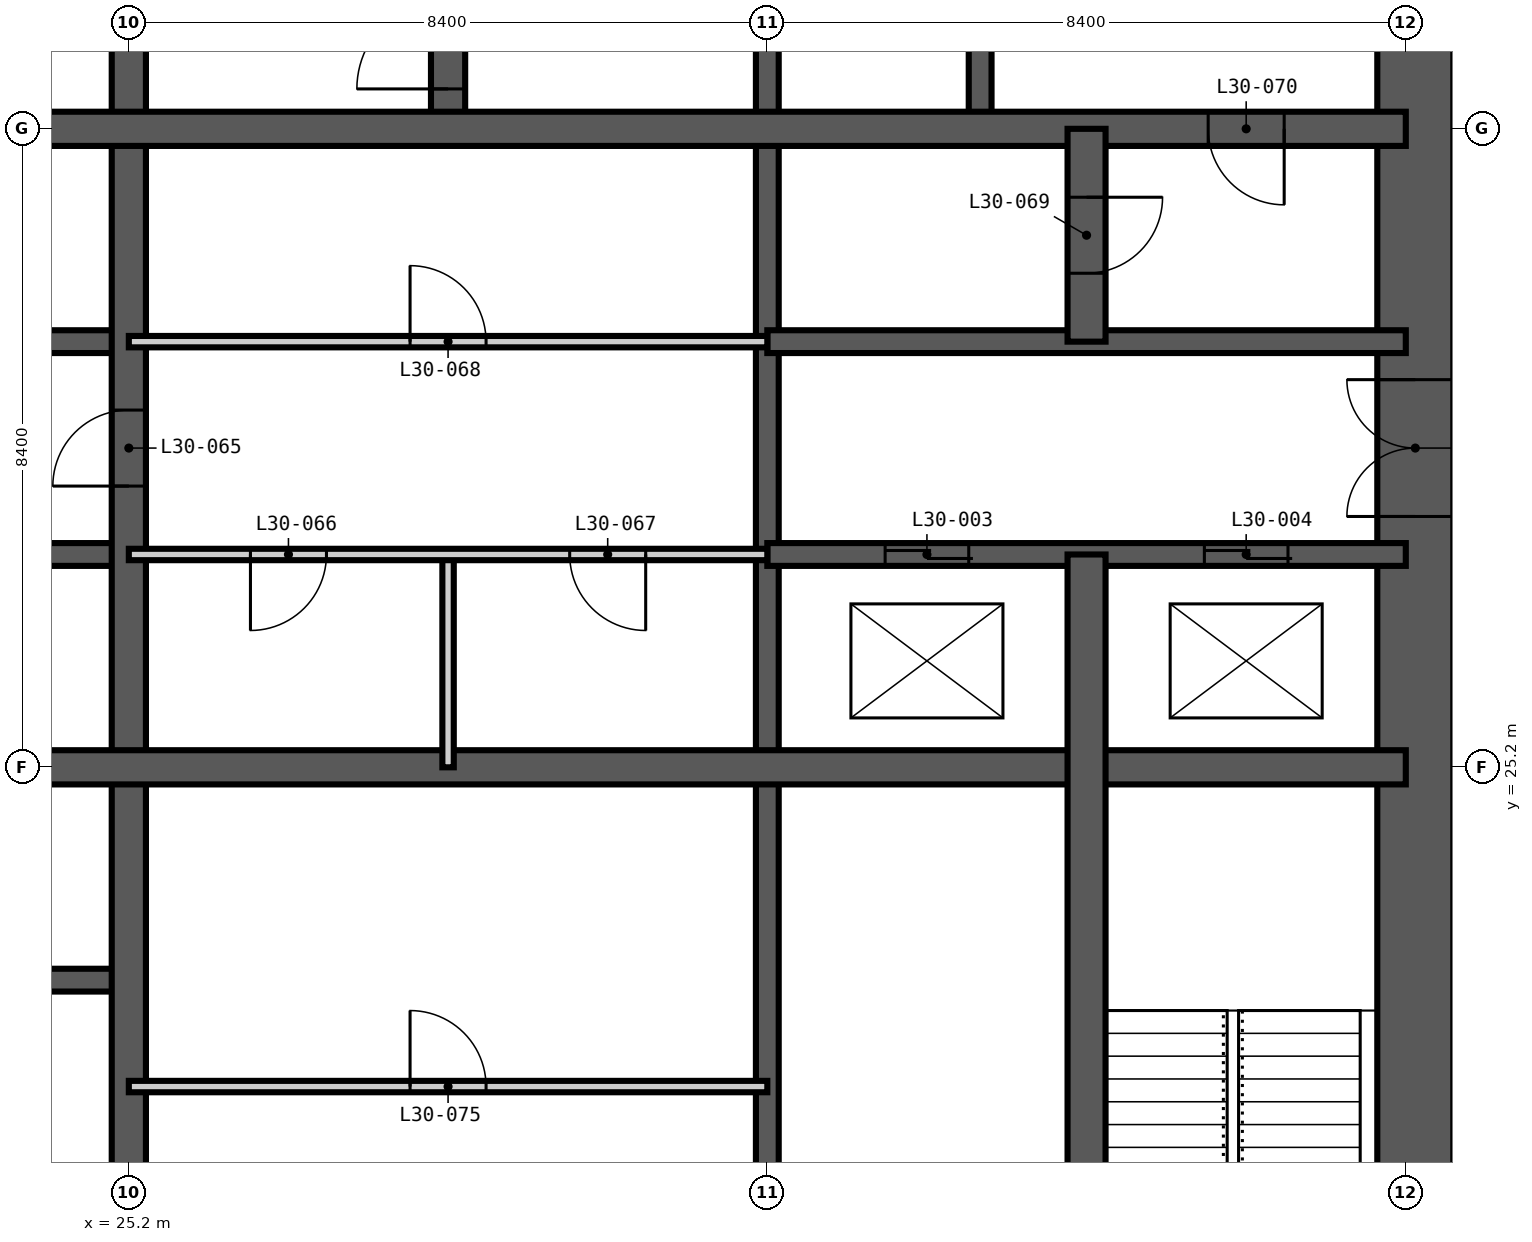
"""IFC4 building model, lengths in metres.
Left out: names, types, materials, properties, quantities, classifications, styles, units other than length and angle.
Written with IfcOpenShell. Run it as: python <this file> out.ifc"""

import sys

from ifc_helpers import new_model, si_unit, direction, frame, frame_2d, origin, place, context, subcontext, project, spatial, rectangle, extrude, element, fill, save


model = new_model("IFC4")
c1 = context("Model", 3, precision=1e-05, world=origin(), true_north=direction((0.0, 1.0)))
c2 = subcontext(c1, "Body", "Model", "MODEL_VIEW")
j1 = project(units=[si_unit("LENGTHUNIT", "METRE"), si_unit("PLANEANGLEUNIT", "RADIAN")], contexts=[c1])
p1 = place(None, origin())
s1 = spatial("IfcSite", under=j1, at=p1, CompositionType="ELEMENT")
p2 = place(p1, origin())
s2 = spatial("IfcBuilding", under=s1, at=p2, CompositionType="ELEMENT")
p3 = place(p2, frame((0.0, 0.0, 118.8)))
s3 = spatial("IfcBuildingStorey", under=s2, at=p3, CompositionType="ELEMENT", Elevation=118.8)
p4 = place(p3, frame((42.125, 17.175, -0.35), z_axis=(0.0, 0.0, 1.0), x_axis=(0.0, 1.0, 0.0)))
e1 = element("IfcWall", 1, at=p4, inside=s3, PredefinedType="SHEAR", context=c2, shape_type="SweptSolid", body=[
    extrude(rectangle(XDim=24.45, YDim=1.0, at=frame_2d((12.225, 0.0))), origin(), (0.0, 0.0, 1.0), 3.6),
])
p5 = place(p4, frame((0.425, 0.0, 0.35)))
e2 = element("IfcOpeningElement", 2, at=p5, cuts=e1, PredefinedType="OPENING", context=c2, shape_type="SweptSolid", body=[
    extrude(rectangle(XDim=1.2, YDim=2.2, at=frame_2d((0.6, 1.1))), frame((0.0, 0.51, 0.0), z_axis=(0.0, -1.0, 0.0), x_axis=(1.0, 0.0, 0.0)), (0.0, 0.0, 1.0), 1.02),
])
p6 = place(p4, frame((11.325, 0.0, 0.35)))
e3 = element("IfcOpeningElement", 3, at=p6, cuts=e1, PredefinedType="OPENING", context=c2, shape_type="SweptSolid", body=[
    extrude(rectangle(XDim=1.8, YDim=2.2, at=frame_2d((0.9, 1.1))), frame((0.0, 0.51, 0.0), z_axis=(0.0, -1.0, 0.0), x_axis=(1.0, 0.0, 0.0)), (0.0, 0.0, 1.0), 1.02),
])
p7 = place(p4, frame((20.125, 0.0, 0.35)))
e4 = element("IfcOpeningElement", 4, at=p7, cuts=e1, PredefinedType="OPENING", context=c2, shape_type="SweptSolid", body=[
    extrude(rectangle(XDim=1.0, YDim=2.1, at=frame_2d((0.5, 1.05))), frame((0.0, 0.51, 0.0), z_axis=(0.0, -1.0, 0.0), x_axis=(1.0, 0.0, 0.0)), (0.0, 0.0, 1.0), 1.02),
])
p8 = place(p3, frame((33.6, 16.8, -0.35), z_axis=(0.0, 0.0, 1.0), x_axis=(0.0, 1.0, 0.0)))
e5 = element("IfcWall", 5, at=p8, inside=s3, PredefinedType="SHEAR", context=c2, shape_type="SweptSolid", body=[
    extrude(rectangle(XDim=25.2, YDim=0.3, at=frame_2d((12.6, 0.0))), origin(), (0.0, 0.0, 1.0), 3.6),
])
p9 = place(p8, frame((22.5, 0.0, 0.35)))
e6 = element("IfcOpeningElement", 6, at=p9, cuts=e5, PredefinedType="OPENING", context=c2, shape_type="SweptSolid", body=[
    extrude(rectangle(XDim=1.2, YDim=2.2, at=frame_2d((0.6, 1.1))), frame((0.0, 0.16, 0.0), z_axis=(0.0, -1.0, 0.0), x_axis=(1.0, 0.0, 0.0)), (0.0, 0.0, 1.0), 0.32),
])
p10 = place(p8, frame((18.3, 0.0, 0.35)))
e7 = element("IfcOpeningElement", 7, at=p10, cuts=e5, PredefinedType="OPENING", context=c2, shape_type="SweptSolid", body=[
    extrude(rectangle(XDim=1.2, YDim=2.2, at=frame_2d((0.6, 1.1))), frame((0.0, 0.16, 0.0), z_axis=(0.0, -1.0, 0.0), x_axis=(1.0, 0.0, 0.0)), (0.0, 0.0, 1.0), 0.32),
])
for number, where, z_axis, x_axis in (
    (8, (36.4, 33.6, -0.35), (0.0, 0.0, 1.0), (0.0, 1.0, 0.0)),
    (9, (16.8, 22.4, -0.35), (0.0, 0.0, 1.0), (1.0, 0.0, 0.0)),
):
    element("IfcWall", number, at=place(p3, frame(where, z_axis=z_axis, x_axis=x_axis)), inside=s3, PredefinedType="SHEAR", context=c2, shape_type="SweptSolid", body=[
        extrude(rectangle(XDim=8.4, YDim=0.3, at=frame_2d((4.2, 0.0))), origin(), (0.0, 0.0, 1.0), 3.6),
    ])
p11 = place(p3, frame((16.8, 28.0, -0.35), z_axis=(0.0, 0.0, 1.0), x_axis=(1.0, 0.0, 0.0)))
e10 = element("IfcWall", 10, at=p11, inside=s3, PredefinedType="SHEAR", context=c2, shape_type="SweptSolid", body=[
    extrude(rectangle(XDim=8.4, YDim=0.3, at=frame_2d((4.2, 0.0))), origin(), (0.0, 0.0, 1.0), 3.6),
])
p12 = place(p11, frame((1.55, 0.0, 0.35)))
e11 = element("IfcOpeningElement", 11, at=p12, cuts=e10, PredefinedType="OPENING", context=c2, shape_type="SweptSolid", body=[
    extrude(rectangle(XDim=1.1, YDim=2.2, at=frame_2d((0.55, 1.1))), frame((0.0, 0.16, 0.0), z_axis=(0.0, -1.0, 0.0), x_axis=(1.0, 0.0, 0.0)), (0.0, 0.0, 1.0), 0.32),
])
p13 = place(p11, frame((5.75, 0.0, 0.35)))
e12 = element("IfcOpeningElement", 12, at=p13, cuts=e10, PredefinedType="OPENING", context=c2, shape_type="SweptSolid", body=[
    extrude(rectangle(XDim=1.1, YDim=2.2, at=frame_2d((0.55, 1.1))), frame((0.0, 0.16, 0.0), z_axis=(0.0, -1.0, 0.0), x_axis=(1.0, 0.0, 0.0)), (0.0, 0.0, 1.0), 0.32),
])
p14 = place(p3, frame((33.6, 28.0, -0.35), z_axis=(0.0, 0.0, 1.0), x_axis=(1.0, 0.0, 0.0)))
e13 = element("IfcWall", 13, at=p14, inside=s3, PredefinedType="SHEAR", context=c2, shape_type="SweptSolid", body=[
    extrude(rectangle(XDim=8.4, YDim=0.3, at=frame_2d((4.2, 0.0))), origin(), (0.0, 0.0, 1.0), 3.6),
])
p15 = place(p14, frame((1.55, 0.0, 0.35)))
e14 = element("IfcOpeningElement", 14, at=p15, cuts=e13, PredefinedType="OPENING", context=c2, shape_type="SweptSolid", body=[
    extrude(rectangle(XDim=1.1, YDim=2.2, at=frame_2d((0.55, 1.1))), frame((0.0, 0.16, 0.0), z_axis=(0.0, -1.0, 0.0), x_axis=(1.0, 0.0, 0.0)), (0.0, 0.0, 1.0), 0.32),
])
p16 = place(p14, frame((5.75, 0.0, 0.35)))
e15 = element("IfcOpeningElement", 15, at=p16, cuts=e13, PredefinedType="OPENING", context=c2, shape_type="SweptSolid", body=[
    extrude(rectangle(XDim=1.1, YDim=2.2, at=frame_2d((0.55, 1.1))), frame((0.0, 0.16, 0.0), z_axis=(0.0, -1.0, 0.0), x_axis=(1.0, 0.0, 0.0)), (0.0, 0.0, 1.0), 0.32),
])
p17 = place(p3, frame((16.8, 30.8, -0.35), z_axis=(0.0, 0.0, 1.0), x_axis=(1.0, 0.0, 0.0)))
e16 = element("IfcWall", 16, at=p17, inside=s3, PredefinedType="SHEAR", context=c2, shape_type="SweptSolid", body=[
    extrude(rectangle(XDim=8.4, YDim=0.3, at=frame_2d((4.2, 0.0))), origin(), (0.0, 0.0, 1.0), 3.6),
])
p18 = place(p17, frame((1.55, 0.0, 0.35)))
e17 = element("IfcOpeningElement", 17, at=p18, cuts=e16, PredefinedType="OPENING", context=c2, shape_type="SweptSolid", body=[
    extrude(rectangle(XDim=1.1, YDim=2.2, at=frame_2d((0.55, 1.1))), frame((0.0, 0.16, 0.0), z_axis=(0.0, -1.0, 0.0), x_axis=(1.0, 0.0, 0.0)), (0.0, 0.0, 1.0), 0.32),
])
p19 = place(p17, frame((5.75, 0.0, 0.35)))
e18 = element("IfcOpeningElement", 18, at=p19, cuts=e16, PredefinedType="OPENING", context=c2, shape_type="SweptSolid", body=[
    extrude(rectangle(XDim=1.1, YDim=2.2, at=frame_2d((0.55, 1.1))), frame((0.0, 0.16, 0.0), z_axis=(0.0, -1.0, 0.0), x_axis=(1.0, 0.0, 0.0)), (0.0, 0.0, 1.0), 0.32),
])
p20 = place(p3, frame((33.6, 30.8, -0.35), z_axis=(0.0, 0.0, 1.0), x_axis=(1.0, 0.0, 0.0)))
e19 = element("IfcWall", 19, at=p20, inside=s3, PredefinedType="SHEAR", context=c2, shape_type="SweptSolid", body=[
    extrude(rectangle(XDim=8.4, YDim=0.3, at=frame_2d((4.2, 0.0))), origin(), (0.0, 0.0, 1.0), 3.6),
])
p21 = place(p3, frame((25.2, 16.8, -0.35), z_axis=(0.0, 0.0, 1.0), x_axis=(0.0, 1.0, 0.0)))
e20 = element("IfcWall", 20, at=p21, inside=s3, PredefinedType="SHEAR", context=c2, shape_type="SweptSolid", body=[
    extrude(rectangle(XDim=25.2, YDim=0.45, at=frame_2d((12.6, 0.0))), origin(), (0.0, 0.0, 1.0), 3.6),
])
p22 = place(p21, frame((12.1, 0.0, 0.35)))
e21 = element("IfcOpeningElement", 21, at=p22, cuts=e20, PredefinedType="OPENING", context=c2, shape_type="SweptSolid", body=[
    extrude(rectangle(XDim=1.0, YDim=2.1, at=frame_2d((0.5, 1.05))), frame((0.0, 0.235, 0.0), z_axis=(0.0, -1.0, 0.0), x_axis=(1.0, 0.0, 0.0)), (0.0, 0.0, 1.0), 0.47),
])
p23 = place(p3, frame((29.4, 33.6, -0.35), z_axis=(0.0, 0.0, 1.0), x_axis=(0.0, 1.0, 0.0)))
e22 = element("IfcWall", 22, at=p23, inside=s3, PredefinedType="SHEAR", context=c2, shape_type="SweptSolid", body=[
    extrude(rectangle(XDim=8.4, YDim=0.45, at=frame_2d((4.2, 0.0))), origin(), (0.0, 0.0, 1.0), 3.6),
])
p24 = place(p23, frame((0.525, 0.0, 0.35)))
e23 = element("IfcOpeningElement", 23, at=p24, cuts=e22, PredefinedType="OPENING", context=c2, shape_type="SweptSolid", body=[
    extrude(rectangle(XDim=1.2, YDim=2.2, at=frame_2d((0.6, 1.1))), frame((0.0, 0.235, 0.0), z_axis=(0.0, -1.0, 0.0), x_axis=(1.0, 0.0, 0.0)), (0.0, 0.0, 1.0), 0.47),
])
p25 = place(p3, frame((16.8, 25.2, -0.35), z_axis=(0.0, 0.0, 1.0), x_axis=(1.0, 0.0, 0.0)))
e24 = element("IfcWall", 24, at=p25, inside=s3, PredefinedType="SHEAR", context=c2, shape_type="SweptSolid", body=[
    extrude(rectangle(XDim=25.2, YDim=0.45, at=frame_2d((12.6, 0.0))), origin(), (0.0, 0.0, 1.0), 3.6),
])
p26 = place(p3, frame((16.8, 33.6, -0.35), z_axis=(0.0, 0.0, 1.0), x_axis=(1.0, 0.0, 0.0)))
e25 = element("IfcWall", 25, at=p26, inside=s3, PredefinedType="SHEAR", context=c2, shape_type="SweptSolid", body=[
    extrude(rectangle(XDim=25.2, YDim=0.45, at=frame_2d((12.6, 0.0))), origin(), (0.0, 0.0, 1.0), 3.6),
])
p27 = place(p26, frame((22.6, 0.0, 0.35)))
e26 = element("IfcOpeningElement", 26, at=p27, cuts=e25, PredefinedType="OPENING", context=c2, shape_type="SweptSolid", body=[
    extrude(rectangle(XDim=1.0, YDim=2.1, at=frame_2d((0.5, 1.05))), frame((0.0, 0.235, 0.0), z_axis=(0.0, -1.0, 0.0), x_axis=(1.0, 0.0, 0.0)), (0.0, 0.0, 1.0), 0.47),
])
p28 = place(p3, frame((37.8, 16.8, -0.35), z_axis=(0.0, 0.0, 1.0), x_axis=(0.0, 1.0, 0.0)))
e27 = element("IfcWall", 27, at=p28, inside=s3, PredefinedType="SHEAR", context=c2, shape_type="SweptSolid", body=[
    extrude(rectangle(XDim=11.2, YDim=0.5, at=frame_2d((5.6, 0.0))), origin(), (0.0, 0.0, 1.0), 3.6),
])
p29 = place(p3, frame((37.8, 30.8, -0.35), z_axis=(0.0, 0.0, 1.0), x_axis=(0.0, 1.0, 0.0)))
e28 = element("IfcWall", 28, at=p29, inside=s3, PredefinedType="SHEAR", context=c2, shape_type="SweptSolid", body=[
    extrude(rectangle(XDim=2.8, YDim=0.5, at=frame_2d((1.4, 0.0))), origin(), (0.0, 0.0, 1.0), 3.6),
])
p30 = place(p29, frame((0.9, 0.0, 0.35)))
e29 = element("IfcOpeningElement", 29, at=p30, cuts=e28, PredefinedType="OPENING", context=c2, shape_type="SweptSolid", body=[
    extrude(rectangle(XDim=1.0, YDim=2.1, at=frame_2d((0.5, 1.05))), frame((0.0, 0.26, 0.0), z_axis=(0.0, -1.0, 0.0), x_axis=(1.0, 0.0, 0.0)), (0.0, 0.0, 1.0), 0.52),
])
p31 = place(p3, frame((29.4, 25.2, 0.0), z_axis=(0.0, 0.0, 1.0), x_axis=(0.0, 1.0, 0.0)))
e30 = element("IfcWall", 30, at=p31, inside=s3, PredefinedType="PARTITIONING", context=c2, shape_type="SweptSolid", body=[
    extrude(rectangle(XDim=2.8, YDim=0.15, at=frame_2d((1.4, 0.0))), origin(), (0.0, 0.0, 1.0), 3.25),
])
p32 = place(p3, frame((25.2, 21.0, 0.0), z_axis=(0.0, 0.0, 1.0), x_axis=(1.0, 0.0, 0.0)))
e31 = element("IfcWall", 31, at=p32, inside=s3, PredefinedType="PARTITIONING", context=c2, shape_type="SweptSolid", body=[
    extrude(rectangle(XDim=8.4, YDim=0.15, at=frame_2d((4.2, 0.0))), origin(), (0.0, 0.0, 1.0), 3.25),
])
p33 = place(p32, frame((3.7, 0.0, 0.0)))
e32 = element("IfcOpeningElement", 32, at=p33, cuts=e31, PredefinedType="OPENING", context=c2, shape_type="SweptSolid", body=[
    extrude(rectangle(XDim=1.0, YDim=2.1, at=frame_2d((0.5, 1.05))), frame((0.0, 0.085, 0.0), z_axis=(0.0, -1.0, 0.0), x_axis=(1.0, 0.0, 0.0)), (0.0, 0.0, 1.0), 0.17),
])
p34 = place(p3, frame((25.2, 28.0, 0.0), z_axis=(0.0, 0.0, 1.0), x_axis=(1.0, 0.0, 0.0)))
e33 = element("IfcWall", 33, at=p34, inside=s3, PredefinedType="PARTITIONING", context=c2, shape_type="SweptSolid", body=[
    extrude(rectangle(XDim=8.4, YDim=0.15, at=frame_2d((4.2, 0.0))), origin(), (0.0, 0.0, 1.0), 3.25),
])
p35 = place(p34, frame((1.6, 0.0, 0.0)))
e34 = element("IfcOpeningElement", 34, at=p35, cuts=e33, PredefinedType="OPENING", context=c2, shape_type="SweptSolid", body=[
    extrude(rectangle(XDim=1.0, YDim=2.1, at=frame_2d((0.5, 1.05))), frame((0.0, 0.085, 0.0), z_axis=(0.0, -1.0, 0.0), x_axis=(1.0, 0.0, 0.0)), (0.0, 0.0, 1.0), 0.17),
])
p36 = place(p34, frame((5.8, 0.0, 0.0)))
e35 = element("IfcOpeningElement", 35, at=p36, cuts=e33, PredefinedType="OPENING", context=c2, shape_type="SweptSolid", body=[
    extrude(rectangle(XDim=1.0, YDim=2.1, at=frame_2d((0.5, 1.05))), frame((0.0, 0.085, 0.0), z_axis=(0.0, -1.0, 0.0), x_axis=(1.0, 0.0, 0.0)), (0.0, 0.0, 1.0), 0.17),
])
p37 = place(p3, frame((25.2, 30.8, 0.0), z_axis=(0.0, 0.0, 1.0), x_axis=(1.0, 0.0, 0.0)))
e36 = element("IfcWall", 36, at=p37, inside=s3, PredefinedType="PARTITIONING", context=c2, shape_type="SweptSolid", body=[
    extrude(rectangle(XDim=8.4, YDim=0.15, at=frame_2d((4.2, 0.0))), origin(), (0.0, 0.0, 1.0), 3.25),
])
p38 = place(p37, frame((3.7, 0.0, 0.0)))
e37 = element("IfcOpeningElement", 37, at=p38, cuts=e36, PredefinedType="OPENING", context=c2, shape_type="SweptSolid", body=[
    extrude(rectangle(XDim=1.0, YDim=2.1, at=frame_2d((0.5, 1.05))), frame((0.0, 0.085, 0.0), z_axis=(0.0, -1.0, 0.0), x_axis=(1.0, 0.0, 0.0)), (0.0, 0.0, 1.0), 0.17),
])
p39 = place(p24, origin())
e38 = element("IfcDoor", 38, at=p39, inside=s3, OperationType="SINGLE_SWING_LEFT", PredefinedType="DOOR", context=c2, shape_type="SweptSolid", body=[
    extrude(rectangle(XDim=1.2, YDim=2.2, at=frame_2d((0.6, 1.1))), frame((0.0, 0.025, 0.0), z_axis=(0.0, -1.0, 0.0), x_axis=(1.0, 0.0, 0.0)), (0.0, 0.0, 1.0), 0.05),
])
fill(e23, e38)
p40 = place(p15, origin())
e39 = element("IfcDoor", 39, at=p40, inside=s3, OperationType="DOUBLE_DOOR_SLIDING", PredefinedType="DOOR", context=c2, shape_type="SweptSolid", body=[
    extrude(rectangle(XDim=1.1, YDim=2.2, at=frame_2d((0.55, 1.1))), frame((0.0, 0.025, 0.0), z_axis=(0.0, -1.0, 0.0), x_axis=(1.0, 0.0, 0.0)), (0.0, 0.0, 1.0), 0.05),
])
fill(e14, e39)
p41 = place(p16, origin())
e40 = element("IfcDoor", 40, at=p41, inside=s3, OperationType="DOUBLE_DOOR_SLIDING", PredefinedType="DOOR", context=c2, shape_type="SweptSolid", body=[
    extrude(rectangle(XDim=1.1, YDim=2.2, at=frame_2d((0.55, 1.1))), frame((0.0, 0.025, 0.0), z_axis=(0.0, -1.0, 0.0), x_axis=(1.0, 0.0, 0.0)), (0.0, 0.0, 1.0), 0.05),
])
fill(e15, e40)
p42 = place(p22, origin())
e41 = element("IfcDoor", 41, at=p42, inside=s3, OperationType="SINGLE_SWING_LEFT", PredefinedType="DOOR", context=c2, shape_type="SweptSolid", body=[
    extrude(rectangle(XDim=1.0, YDim=2.1, at=frame_2d((0.5, 1.05))), frame((0.0, 0.025, 0.0), z_axis=(0.0, -1.0, 0.0), x_axis=(1.0, 0.0, 0.0)), (0.0, 0.0, 1.0), 0.05),
])
fill(e21, e41)
p43 = place(p35, frame((1.0, 0.0, 0.0), z_axis=(0.0, 0.0, 1.0), x_axis=(-1.0, 0.0, 0.0)))
e42 = element("IfcDoor", 42, at=p43, inside=s3, OperationType="SINGLE_SWING_RIGHT", PredefinedType="DOOR", context=c2, shape_type="SweptSolid", body=[
    extrude(rectangle(XDim=1.0, YDim=2.1, at=frame_2d((0.5, 1.05))), frame((0.0, 0.025, 0.0), z_axis=(0.0, -1.0, 0.0), x_axis=(1.0, 0.0, 0.0)), (0.0, 0.0, 1.0), 0.05),
])
fill(e34, e42)
p44 = place(p36, frame((1.0, 0.0, 0.0), z_axis=(0.0, 0.0, 1.0), x_axis=(-1.0, 0.0, 0.0)))
e43 = element("IfcDoor", 43, at=p44, inside=s3, OperationType="SINGLE_SWING_LEFT", PredefinedType="DOOR", context=c2, shape_type="SweptSolid", body=[
    extrude(rectangle(XDim=1.0, YDim=2.1, at=frame_2d((0.5, 1.05))), frame((0.0, 0.025, 0.0), z_axis=(0.0, -1.0, 0.0), x_axis=(1.0, 0.0, 0.0)), (0.0, 0.0, 1.0), 0.05),
])
fill(e35, e43)
p45 = place(p38, origin())
e44 = element("IfcDoor", 44, at=p45, inside=s3, OperationType="SINGLE_SWING_LEFT", PredefinedType="DOOR", context=c2, shape_type="SweptSolid", body=[
    extrude(rectangle(XDim=1.0, YDim=2.1, at=frame_2d((0.5, 1.05))), frame((0.0, 0.025, 0.0), z_axis=(0.0, -1.0, 0.0), x_axis=(1.0, 0.0, 0.0)), (0.0, 0.0, 1.0), 0.05),
])
fill(e37, e44)
p46 = place(p30, frame((1.0, 0.0, 0.0), z_axis=(0.0, 0.0, 1.0), x_axis=(-1.0, 0.0, 0.0)))
e45 = element("IfcDoor", 45, at=p46, inside=s3, OperationType="SINGLE_SWING_LEFT", PredefinedType="DOOR", context=c2, shape_type="SweptSolid", body=[
    extrude(rectangle(XDim=1.0, YDim=2.1, at=frame_2d((0.5, 1.05))), frame((0.0, 0.025, 0.0), z_axis=(0.0, -1.0, 0.0), x_axis=(1.0, 0.0, 0.0)), (0.0, 0.0, 1.0), 0.05),
])
fill(e29, e45)
p47 = place(p27, frame((1.0, 0.0, 0.0), z_axis=(0.0, 0.0, 1.0), x_axis=(-1.0, 0.0, 0.0)))
e46 = element("IfcDoor", 46, at=p47, inside=s3, OperationType="SINGLE_SWING_LEFT", PredefinedType="DOOR", context=c2, shape_type="SweptSolid", body=[
    extrude(rectangle(XDim=1.0, YDim=2.1, at=frame_2d((0.5, 1.05))), frame((0.0, 0.025, 0.0), z_axis=(0.0, -1.0, 0.0), x_axis=(1.0, 0.0, 0.0)), (0.0, 0.0, 1.0), 0.05),
])
fill(e26, e46)
p48 = place(p6, origin())
e47 = element("IfcDoor", 47, at=p48, inside=s3, OperationType="DOUBLE_DOOR_DOUBLE_SWING", PredefinedType="DOOR", context=c2, shape_type="SweptSolid", body=[
    extrude(rectangle(XDim=1.8, YDim=2.2, at=frame_2d((0.9, 1.1))), frame((0.0, 0.025, 0.0), z_axis=(0.0, -1.0, 0.0), x_axis=(1.0, 0.0, 0.0)), (0.0, 0.0, 1.0), 0.05),
])
fill(e3, e47)
p49 = place(p33, origin())
e48 = element("IfcDoor", 48, at=p49, inside=s3, OperationType="SINGLE_SWING_LEFT", PredefinedType="DOOR", context=c2, shape_type="SweptSolid", body=[
    extrude(rectangle(XDim=1.0, YDim=2.1, at=frame_2d((0.5, 1.05))), frame((0.0, 0.025, 0.0), z_axis=(0.0, -1.0, 0.0), x_axis=(1.0, 0.0, 0.0)), (0.0, 0.0, 1.0), 0.05),
])
fill(e32, e48)
save(model, sys.argv[1])
